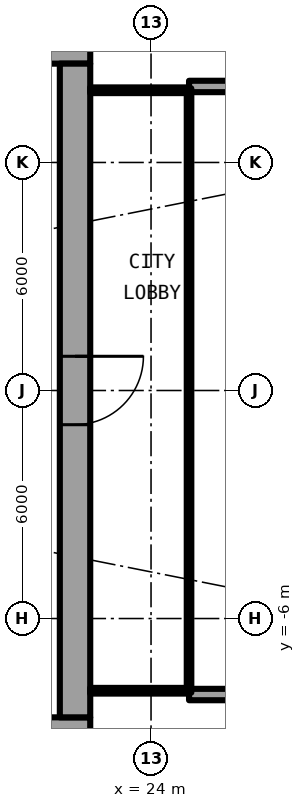
"""IFC4 building model, lengths in metres.
Left out: names, types, materials, properties, quantities, classifications, styles, units other than length and angle.
Written with IfcOpenShell. Run it as: python <this file> out.ifc"""

import sys

from ifc_helpers import new_model, si_unit, direction, frame, frame_2d, origin, place, context, subcontext, project, spatial, rectangle, extrude, element, fill, save


model = new_model("IFC4")
c1 = context("Model", 3, precision=1e-05, world=origin(), true_north=direction((0.0, 1.0)))
c2 = subcontext(c1, "Body", "Model", "MODEL_VIEW")
j1 = project(units=[si_unit("LENGTHUNIT", "METRE"), si_unit("PLANEANGLEUNIT", "RADIAN")], contexts=[c1])
p1 = place(None, origin())
s1 = spatial("IfcSite", under=j1, at=p1, CompositionType="ELEMENT")
p2 = place(p1, origin())
s2 = spatial("IfcBuilding", under=s1, at=p2, CompositionType="ELEMENT")
p3 = place(p2, frame((0.0, 0.0, 41.1)))
s3 = spatial("IfcBuildingStorey", under=s2, at=p3, CompositionType="ELEMENT", Elevation=41.1)
for number, where, z_axis, x_axis in (
    (1, (25.0, 8.0, 0.0), (0.0, 0.0, 1.0), (1.0, 0.0, 0.0)),
    (2, (25.0, -8.0, 0.0), (0.0, 0.0, 1.0), (1.0, 0.0, 0.0)),
):
    element("IfcWall", number, at=place(p3, frame(where, z_axis=z_axis, x_axis=x_axis)), inside=s3, PredefinedType="SOLIDWALL", context=c2, shape_type="SweptSolid", body=[
        extrude(rectangle(XDim=2.667, YDim=0.3, at=frame_2d((1.333, 0.0))), origin(), (0.0, 0.0, 1.0), 2.7),
    ])
p4 = place(p3, frame((22.4, 9.0, 0.0), z_axis=(0.0, 0.0, 1.0), x_axis=(-1.0, 0.0, 0.0)))
e3 = element("IfcWall", 3, at=p4, inside=s3, PredefinedType="SHEAR", context=c2, shape_type="SweptSolid", body=[
    extrude(rectangle(XDim=14.2, YDim=0.8, at=frame_2d((7.1, 0.0))), origin(), (0.0, 0.0, 1.0), 3.05),
])
p5 = place(p4, frame((1.325, 0.0, 0.0)))
e4 = element("IfcOpeningElement", 4, at=p5, cuts=e3, PredefinedType="OPENING", context=c2, shape_type="SweptSolid", body=[
    extrude(rectangle(XDim=1.2, YDim=2.3, at=frame_2d((0.6, 1.15))), frame((0.0, 0.41, 0.0), z_axis=(0.0, -1.0, 0.0), x_axis=(1.0, 0.0, 0.0)), (0.0, 0.0, 1.0), 0.82),
])
p6 = place(p3, frame((8.2, -9.0, 0.0), z_axis=(0.0, 0.0, 1.0), x_axis=(1.0, 0.0, 0.0)))
e5 = element("IfcWall", 5, at=p6, inside=s3, PredefinedType="SHEAR", context=c2, shape_type="SweptSolid", body=[
    extrude(rectangle(XDim=14.2, YDim=0.8, at=frame_2d((7.1, 0.0))), origin(), (0.0, 0.0, 1.0), 3.05),
])
p7 = place(p6, frame((11.675, 0.0, 0.0)))
e6 = element("IfcOpeningElement", 6, at=p7, cuts=e5, PredefinedType="OPENING", context=c2, shape_type="SweptSolid", body=[
    extrude(rectangle(XDim=1.2, YDim=2.3, at=frame_2d((0.6, 1.15))), frame((0.0, 0.41, 0.0), z_axis=(0.0, -1.0, 0.0), x_axis=(1.0, 0.0, 0.0)), (0.0, 0.0, 1.0), 0.82),
])
p8 = place(p3, frame((22.0, 8.6, 0.0), z_axis=(0.0, 0.0, 1.0), x_axis=(0.0, -1.0, 0.0)))
e7 = element("IfcWall", 7, at=p8, inside=s3, PredefinedType="SHEAR", context=c2, shape_type="SweptSolid", body=[
    extrude(rectangle(XDim=17.2, YDim=0.8, at=frame_2d((8.6, 0.0))), origin(), (0.0, 0.0, 1.0), 3.05),
])
p9 = place(p8, frame((7.7, 0.0, 0.0)))
e8 = element("IfcOpeningElement", 8, at=p9, cuts=e7, PredefinedType="OPENING", context=c2, shape_type="SweptSolid", body=[
    extrude(rectangle(XDim=1.8, YDim=2.3, at=frame_2d((0.9, 1.15))), frame((0.0, 0.41, 0.0), z_axis=(0.0, -1.0, 0.0), x_axis=(1.0, 0.0, 0.0)), (0.0, 0.0, 1.0), 0.82),
])
for number, where, z_axis, x_axis in (
    (9, (22.4, -7.9, 0.0), (0.0, 0.0, 1.0), (1.0, 0.0, 0.0)),
    (10, (22.4, 7.9, 0.0), (0.0, 0.0, 1.0), (1.0, 0.0, 0.0)),
):
    element("IfcWall", number, at=place(p3, frame(where, z_axis=z_axis, x_axis=x_axis)), inside=s3, PredefinedType="PARTITIONING", context=c2, shape_type="SweptSolid", body=[
        extrude(rectangle(XDim=2.54, YDim=0.15, at=frame_2d((1.27, 0.0))), origin(), (0.0, 0.0, 1.0), 2.7),
    ])
p10 = place(p3, frame((25.0, -7.95, 0.0), z_axis=(0.0, 0.0, 1.0), x_axis=(0.0, 1.0, 0.0)))
e11 = element("IfcWall", 11, at=p10, inside=s3, PredefinedType="PARTITIONING", context=c2, shape_type="SweptSolid", body=[
    extrude(rectangle(XDim=15.9, YDim=0.12, at=frame_2d((7.95, 0.0))), origin(), (0.0, 0.0, 1.0), 2.7),
])
p11 = place(p10, frame((0.95, 0.0, 0.1)))
e12 = element("IfcOpeningElement", 12, at=p11, cuts=e11, PredefinedType="OPENING", context=c2, shape_type="SweptSolid", body=[
    extrude(rectangle(XDim=14.0, YDim=2.35, at=frame_2d((7.0, 1.175))), frame((0.0, 0.07, 0.0), z_axis=(0.0, -1.0, 0.0), x_axis=(1.0, 0.0, 0.0)), (0.0, 0.0, 1.0), 0.14),
])
p12 = place(p9, origin())
e13 = element("IfcDoor", 13, at=p12, inside=s3, OperationType="SINGLE_SWING_LEFT", PredefinedType="DOOR", context=c2, shape_type="SweptSolid", body=[
    extrude(rectangle(XDim=1.8, YDim=2.3, at=frame_2d((0.9, 1.15))), frame((0.0, 0.025, 0.0), z_axis=(0.0, -1.0, 0.0), x_axis=(1.0, 0.0, 0.0)), (0.0, 0.0, 1.0), 0.05),
])
fill(e8, e13)
p13 = place(p11, origin())
e14 = element("IfcWindow", 14, at=p13, inside=s3, PartitioningType="SINGLE_PANEL", PredefinedType="WINDOW", context=c2, shape_type="SweptSolid", body=[
    extrude(rectangle(XDim=14.0, YDim=2.35, at=frame_2d((7.0, 1.175))), frame((0.0, 0.03, 0.0), z_axis=(0.0, -1.0, 0.0), x_axis=(1.0, 0.0, 0.0)), (0.0, 0.0, 1.0), 0.06),
])
fill(e12, e14)
save(model, sys.argv[1])
